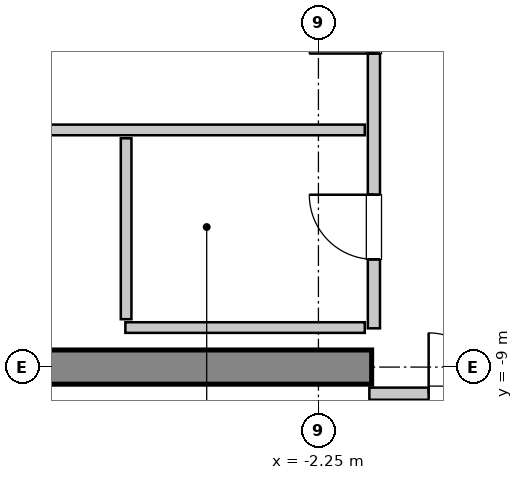
"""IFC4 building model, lengths in metres.
Left out: names, types, materials, properties, quantities, classifications, styles, units other than length and angle.
Written with IfcOpenShell. Run it as: python <this file> out.ifc"""

import sys

from ifc_helpers import new_model, si_unit, direction, frame, frame_2d, origin, place, context, subcontext, project, spatial, rectangle, extrude, source, transform, mapped, element, fill, save


model = new_model("IFC4")
c1 = context("Model", 3, precision=1e-05, world=origin(), true_north=direction((0.0, 1.0)))
c2 = subcontext(c1, "Body", "Model", "MODEL_VIEW")
j1 = project(units=[si_unit("LENGTHUNIT", "METRE"), si_unit("PLANEANGLEUNIT", "RADIAN")], contexts=[c1])
p1 = place(None, origin())
s1 = spatial("IfcSite", under=j1, at=p1, CompositionType="ELEMENT")
p2 = place(p1, origin())
s2 = spatial("IfcBuilding", under=s1, at=p2, CompositionType="ELEMENT")
p3 = place(p2, frame((0.0, 0.0, 272.2)))
s3 = spatial("IfcBuildingStorey", under=s2, at=p3, CompositionType="ELEMENT", Elevation=272.2)
m1 = source(origin(), c2, "Body", "SweptSolid", [
    extrude(rectangle(XDim=9.925, YDim=0.45, at=frame_2d((4.962, 0.0))), origin(), (0.0, 0.0, 1.0), 3.8),
])
p4 = place(p3, frame((-11.475, -9.0, 0.0), z_axis=(0.0, 0.0, 1.0), x_axis=(1.0, 0.0, 0.0)))
e1 = element("IfcWall", 1, at=p4, inside=s3, PredefinedType="SHEAR", context=c2, shape_type="MappedRepresentation", body=[
    mapped(m1, transform((0.0, 0.0, 0.0), x_axis=(1.0, 0.0, 0.0), y_axis=(0.0, 1.0, 0.0), z_axis=(0.0, 0.0, 1.0), scale=1.0)),
])
m2 = source(origin(), c2, "Body", "SweptSolid", [
    extrude(rectangle(XDim=3.16, YDim=0.16, at=frame_2d((1.58, 0.0))), origin(), (0.0, 0.0, 1.0), 2.625),
])
p5 = place(p3, frame((-1.58, -9.35, 0.0), z_axis=(0.0, 0.0, 1.0), x_axis=(1.0, 0.0, 0.0)))
e2 = element("IfcWall", 2, at=p5, inside=s3, PredefinedType="PARTITIONING", context=c2, shape_type="MappedRepresentation", body=[
    mapped(m2, transform((0.0, 0.0, 0.0), x_axis=(1.0, 0.0, 0.0), y_axis=(0.0, 1.0, 0.0), z_axis=(0.0, 0.0, 1.0), scale=1.0)),
])
p6 = place(p5, frame((0.78, 0.0, 0.0)))
e3 = element("IfcOpeningElement", 3, at=p6, cuts=e2, PredefinedType="OPENING", context=c2, shape_type="SweptSolid", body=[
    extrude(rectangle(XDim=1.6, YDim=2.3, at=frame_2d((0.8, 1.15))), frame((0.0, 0.09, 0.0), z_axis=(0.0, -1.0, 0.0), x_axis=(1.0, 0.0, 0.0)), (0.0, 0.0, 1.0), 0.18),
])
m3 = source(origin(), c2, "Body", "SweptSolid", [
    extrude(rectangle(XDim=5.48, YDim=0.16, at=frame_2d((2.74, 0.0))), origin(), (0.0, 0.0, 1.0), 3.535),
])
p7 = place(p3, frame((-1.52, -8.49, 0.0), z_axis=(0.0, 0.0, 1.0), x_axis=(0.0, 1.0, 0.0)))
e4 = element("IfcWall", 4, at=p7, inside=s3, PredefinedType="PARTITIONING", context=c2, shape_type="MappedRepresentation", body=[
    mapped(m3, transform((0.0, 0.0, 0.0), x_axis=(1.0, 0.0, 0.0), y_axis=(0.0, 1.0, 0.0), z_axis=(0.0, 0.0, 1.0), scale=1.0)),
])
p8 = place(p7, frame((0.907, 0.0, 0.0)))
e5 = element("IfcOpeningElement", 5, at=p8, cuts=e4, PredefinedType="OPENING", context=c2, shape_type="SweptSolid", body=[
    extrude(rectangle(XDim=0.85, YDim=2.1, at=frame_2d((0.425, 1.05))), frame((0.0, 0.09, 0.0), z_axis=(0.0, -1.0, 0.0), x_axis=(1.0, 0.0, 0.0)), (0.0, 0.0, 1.0), 0.18),
])
p9 = place(p7, frame((3.615, 0.0, 0.0)))
e6 = element("IfcOpeningElement", 6, at=p9, cuts=e4, PredefinedType="OPENING", context=c2, shape_type="SweptSolid", body=[
    extrude(rectangle(XDim=0.85, YDim=2.1, at=frame_2d((0.425, 1.05))), frame((0.0, 0.09, 0.0), z_axis=(0.0, -1.0, 0.0), x_axis=(1.0, 0.0, 0.0)), (0.0, 0.0, 1.0), 0.18),
])
m4 = source(origin(), c2, "Body", "SweptSolid", [
    extrude(rectangle(XDim=5.55, YDim=0.14, at=frame_2d((2.775, 0.0))), origin(), (0.0, 0.0, 1.0), 3.535),
])
p10 = place(p3, frame((-7.19, -5.88, 0.0), z_axis=(0.0, 0.0, 1.0), x_axis=(1.0, 0.0, 0.0)))
e7 = element("IfcWall", 7, at=p10, inside=s3, PredefinedType="PARTITIONING", context=c2, shape_type="MappedRepresentation", body=[
    mapped(m4, transform((0.0, 0.0, 0.0), x_axis=(1.0, 0.0, 0.0), y_axis=(0.0, 1.0, 0.0), z_axis=(0.0, 0.0, 1.0), scale=1.0)),
])
m5 = source(origin(), c2, "Body", "SweptSolid", [
    extrude(rectangle(XDim=3.15, YDim=0.14, at=frame_2d((1.575, 0.0))), origin(), (0.0, 0.0, 1.0), 3.535),
])
p11 = place(p3, frame((-4.79, -8.48, 0.0), z_axis=(0.0, 0.0, 1.0), x_axis=(1.0, 0.0, 0.0)))
e8 = element("IfcWall", 8, at=p11, inside=s3, PredefinedType="PARTITIONING", context=c2, shape_type="MappedRepresentation", body=[
    mapped(m5, transform((0.0, 0.0, 0.0), x_axis=(1.0, 0.0, 0.0), y_axis=(0.0, 1.0, 0.0), z_axis=(0.0, 0.0, 1.0), scale=1.0)),
])
m6 = source(origin(), c2, "Body", "SweptSolid", [
    extrude(rectangle(XDim=2.38, YDim=0.14, at=frame_2d((1.19, 0.0))), origin(), (0.0, 0.0, 1.0), 3.535),
])
p12 = place(p3, frame((-4.78, -8.37, 0.0), z_axis=(0.0, 0.0, 1.0), x_axis=(0.0, 1.0, 0.0)))
e9 = element("IfcWall", 9, at=p12, inside=s3, PredefinedType="PARTITIONING", context=c2, shape_type="MappedRepresentation", body=[
    mapped(m6, transform((0.0, 0.0, 0.0), x_axis=(1.0, 0.0, 0.0), y_axis=(0.0, 1.0, 0.0), z_axis=(0.0, 0.0, 1.0), scale=1.0)),
])
m7 = source(origin(), c2, "Body", "SweptSolid", [
    extrude(rectangle(XDim=1.6, YDim=2.3, at=frame_2d((0.8, 1.15))), frame((0.0, 0.025, 0.0), z_axis=(0.0, -1.0, 0.0), x_axis=(1.0, 0.0, 0.0)), (0.0, 0.0, 1.0), 0.05),
])
p13 = place(p6, origin())
e10 = element("IfcDoor", 10, at=p13, inside=s3, OperationType="DOUBLE_DOOR_SINGLE_SWING", PredefinedType="DOOR", context=c2, shape_type="MappedRepresentation", body=[
    mapped(m7, transform((0.0, 0.0, 0.0), x_axis=(1.0, 0.0, 0.0), y_axis=(0.0, 1.0, 0.0), z_axis=(0.0, 0.0, 1.0), scale=1.0)),
])
fill(e3, e10)
m8 = source(origin(), c2, "Body", "SweptSolid", [
    extrude(rectangle(XDim=0.85, YDim=2.1, at=frame_2d((0.425, 1.05))), frame((0.0, 0.025, 0.0), z_axis=(0.0, -1.0, 0.0), x_axis=(1.0, 0.0, 0.0)), (0.0, 0.0, 1.0), 0.05),
])
p14 = place(p8, origin())
e11 = element("IfcDoor", 11, at=p14, inside=s3, OperationType="SINGLE_SWING_RIGHT", PredefinedType="DOOR", context=c2, shape_type="MappedRepresentation", body=[
    mapped(m8, transform((0.0, 0.0, 0.0), x_axis=(1.0, 0.0, 0.0), y_axis=(0.0, 1.0, 0.0), z_axis=(0.0, 0.0, 1.0), scale=1.0)),
])
fill(e5, e11)
p15 = place(p9, origin())
e12 = element("IfcDoor", 12, at=p15, inside=s3, OperationType="SINGLE_SWING_LEFT", PredefinedType="DOOR", context=c2, shape_type="MappedRepresentation", body=[
    mapped(m8, transform((0.0, 0.0, 0.0), x_axis=(1.0, 0.0, 0.0), y_axis=(0.0, 1.0, 0.0), z_axis=(0.0, 0.0, 1.0), scale=1.0)),
])
fill(e6, e12)
save(model, sys.argv[1])
